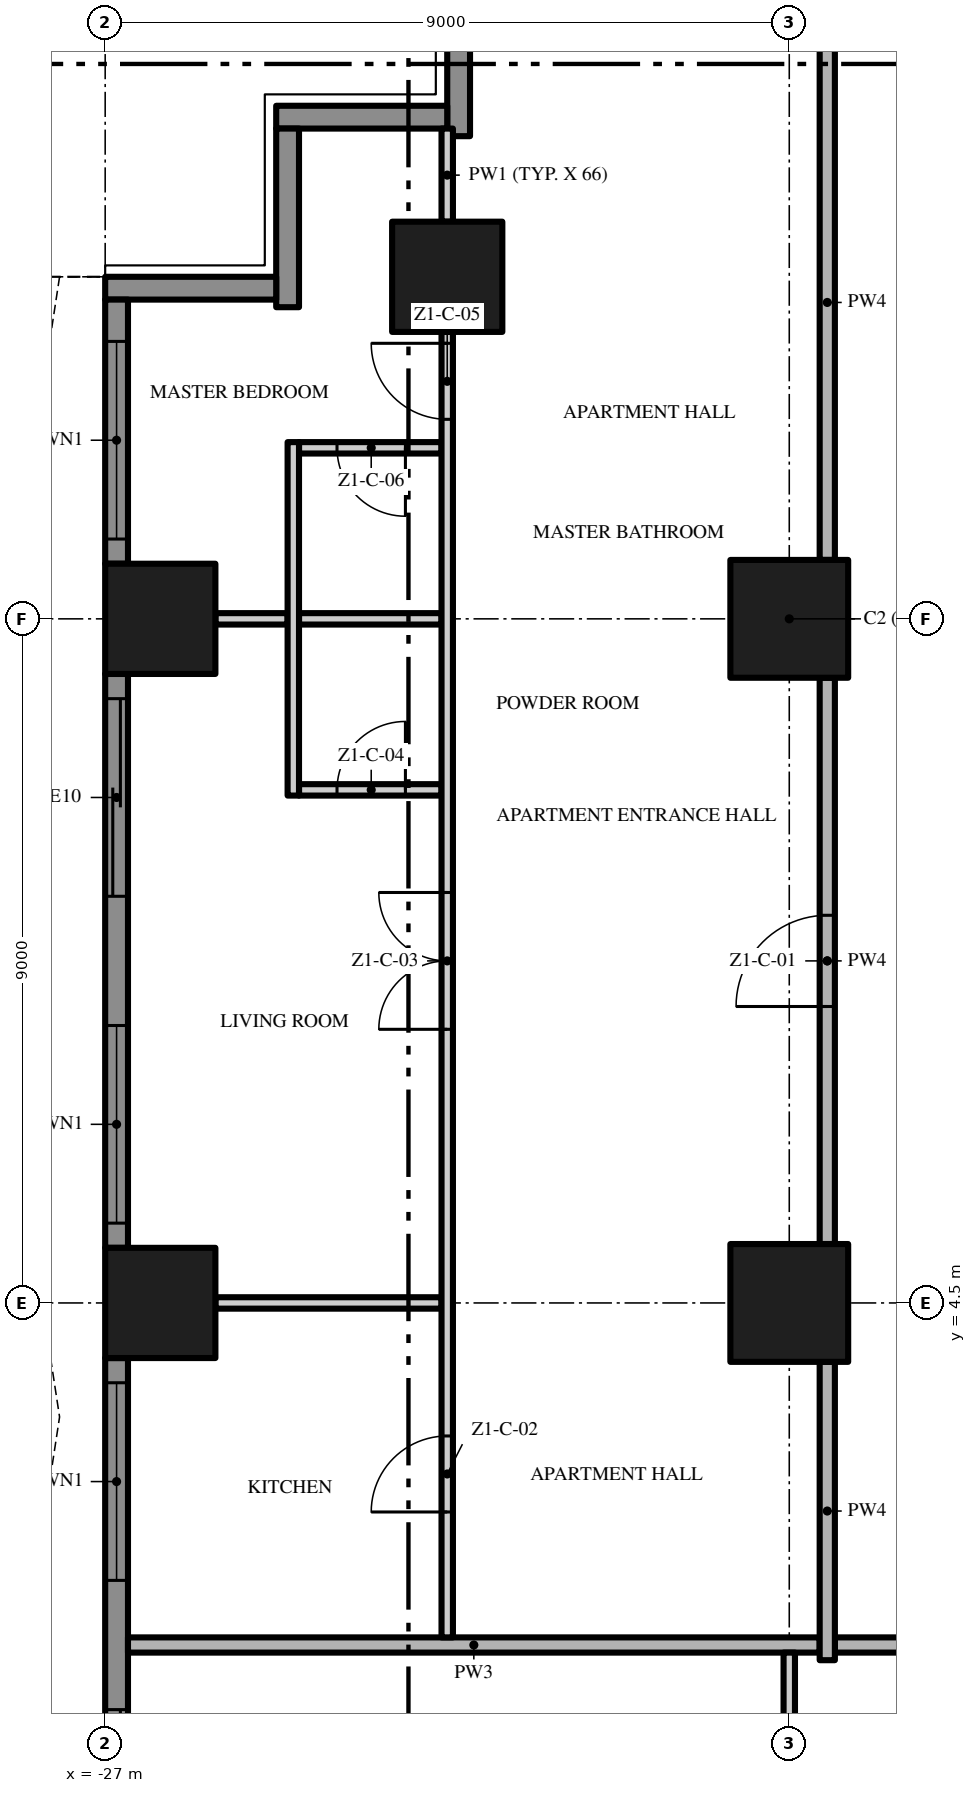
"""IFC4 building model, lengths in metres.
Left out: names, types, materials, properties, quantities, classifications, styles, units other than length and angle.
Written with IfcOpenShell. Run it as: python <this file> out.ifc"""

import sys

from ifc_helpers import new_model, si_unit, direction, frame, frame_2d, origin, origin_2d, place, context, subcontext, project, spatial, polyline, rectangle, outline, extrude, element, fill, save


model = new_model("IFC4")
c1 = context("Model", 3, precision=1e-05, world=origin(), true_north=direction((0.0, 1.0)))
c2 = subcontext(c1, "Body", "Model", "MODEL_VIEW")
j1 = project(units=[si_unit("LENGTHUNIT", "METRE"), si_unit("PLANEANGLEUNIT", "RADIAN")], contexts=[c1])
p1 = place(None, origin())
s1 = spatial("IfcSite", under=j1, at=p1, CompositionType="ELEMENT")
p2 = place(p1, origin())
s2 = spatial("IfcBuilding", under=s1, at=p2, CompositionType="ELEMENT")
p3 = place(p2, frame((0.0, 0.0, 37.8)))
s3 = spatial("IfcBuildingStorey", under=s2, at=p3, CompositionType="ELEMENT", Elevation=37.8)
for number, where, z_axis, x_axis in (
    (1, (-18.0, 13.5, 0.0), (0.0, 0.0, 1.0), (1.0, 0.0, 0.0)),
    (2, (-18.0, 4.5, 0.0), (0.0, 0.0, 1.0), (1.0, 0.0, 0.0)),
):
    element("IfcColumn", number, at=place(p3, frame(where, z_axis=z_axis, x_axis=x_axis)), inside=s3, PredefinedType="COLUMN", context=c2, shape_type="SweptSolid", body=[
        extrude(rectangle(XDim=1.55, YDim=1.55, at=origin_2d()), origin(), (0.0, 0.0, 1.0), 3.5),
    ])
for number, where, z_axis, x_axis in (
    (3, (-26.275, 13.5, 0.0), (0.0, 0.0, 1.0), (1.0, 0.0, 0.0)),
    (4, (-22.5, 18.0, 0.0), (0.0, 0.0, 1.0), (1.0, 0.0, 0.0)),
    (5, (-26.275, 4.5, 0.0), (0.0, 0.0, 1.0), (1.0, 0.0, 0.0)),
):
    element("IfcColumn", number, at=place(p3, frame(where, z_axis=z_axis, x_axis=x_axis)), inside=s3, PredefinedType="COLUMN", context=c2, shape_type="SweptSolid", body=[
        extrude(rectangle(XDim=1.45, YDim=1.45, at=origin_2d()), origin(), (0.0, 0.0, 1.0), 3.5),
    ])
p4 = place(p3, frame((-22.35, 19.85, 0.0), z_axis=(0.0, 0.0, 1.0), x_axis=(0.0, 1.0, 0.0)))
e6 = element("IfcWall", 6, at=p4, inside=s3, PredefinedType="SOLIDWALL", context=c2, shape_type="SweptSolid", body=[
    extrude(rectangle(XDim=2.35, YDim=0.3, at=frame_2d((1.175, 0.0))), origin(), (0.0, 0.0, 1.0), 3.5),
])
p5 = place(p3, frame((-24.75, 20.1, 0.0), z_axis=(0.0, 0.0, 1.0), x_axis=(1.0, 0.0, 0.0)))
e7 = element("IfcWall", 7, at=p5, inside=s3, PredefinedType="SOLIDWALL", context=c2, shape_type="SweptSolid", body=[
    extrude(rectangle(XDim=2.25, YDim=0.3, at=frame_2d((1.125, 0.0))), origin(), (0.0, 0.0, 1.0), 3.5),
])
p6 = place(p3, frame((-24.6, 17.6, 0.0), z_axis=(0.0, 0.0, 1.0), x_axis=(0.0, 1.0, 0.0)))
e8 = element("IfcWall", 8, at=p6, inside=s3, PredefinedType="SOLIDWALL", context=c2, shape_type="SweptSolid", body=[
    extrude(rectangle(XDim=2.35, YDim=0.3, at=frame_2d((1.175, 0.0))), origin(), (0.0, 0.0, 1.0), 3.5),
])
p7 = place(p3, frame((-27.0, 17.85, 0.0), z_axis=(0.0, 0.0, 1.0), x_axis=(1.0, 0.0, 0.0)))
e9 = element("IfcWall", 9, at=p7, inside=s3, PredefinedType="SOLIDWALL", context=c2, shape_type="SweptSolid", body=[
    extrude(rectangle(XDim=2.25, YDim=0.3, at=frame_2d((1.125, 0.0))), origin(), (0.0, 0.0, 1.0), 3.5),
])
p8 = place(p3, frame((-26.85, 14.225, 0.0), z_axis=(0.0, 0.0, 1.0), x_axis=(0.0, 1.0, 0.0)))
e10 = element("IfcWall", 10, at=p8, inside=s3, PredefinedType="SOLIDWALL", context=c2, shape_type="SweptSolid", body=[
    extrude(rectangle(XDim=3.475, YDim=0.3, at=frame_2d((1.738, 0.0))), origin(), (0.0, 0.0, 1.0), 3.5),
])
p9 = place(p8, frame((0.325, 0.0, 0.45)))
e11 = element("IfcOpeningElement", 11, at=p9, cuts=e10, PredefinedType="OPENING", context=c2, shape_type="SweptSolid", body=[
    extrude(rectangle(XDim=2.6, YDim=2.65, at=frame_2d((1.3, 1.325))), frame((0.0, 0.16, 0.0), z_axis=(0.0, -1.0, 0.0), x_axis=(1.0, 0.0, 0.0)), (0.0, 0.0, 1.0), 0.32),
])
p10 = place(p3, frame((-26.85, 5.225, 0.0), z_axis=(0.0, 0.0, 1.0), x_axis=(0.0, 1.0, 0.0)))
e12 = element("IfcWall", 12, at=p10, inside=s3, PredefinedType="SOLIDWALL", context=c2, shape_type="SweptSolid", body=[
    extrude(rectangle(XDim=7.55, YDim=0.3, at=frame_2d((3.775, 0.0))), origin(), (0.0, 0.0, 1.0), 3.5),
])
p11 = place(p10, frame((4.625, 0.0, 0.0)))
e13 = element("IfcOpeningElement", 13, at=p11, cuts=e12, PredefinedType="OPENING", context=c2, shape_type="SweptSolid", body=[
    extrude(rectangle(XDim=2.6, YDim=2.4, at=frame_2d((1.3, 1.2))), frame((0.0, 0.16, 0.0), z_axis=(0.0, -1.0, 0.0), x_axis=(1.0, 0.0, 0.0)), (0.0, 0.0, 1.0), 0.32),
])
p12 = place(p10, frame((0.325, 0.0, 0.45)))
e14 = element("IfcOpeningElement", 14, at=p12, cuts=e12, PredefinedType="OPENING", context=c2, shape_type="SweptSolid", body=[
    extrude(rectangle(XDim=2.6, YDim=2.65, at=frame_2d((1.3, 1.325))), frame((0.0, 0.16, 0.0), z_axis=(0.0, -1.0, 0.0), x_axis=(1.0, 0.0, 0.0)), (0.0, 0.0, 1.0), 0.32),
])
p13 = place(p3, frame((-26.85, -3.775, 0.0), z_axis=(0.0, 0.0, 1.0), x_axis=(0.0, 1.0, 0.0)))
e15 = element("IfcWall", 15, at=p13, inside=s3, PredefinedType="SOLIDWALL", context=c2, shape_type="SweptSolid", body=[
    extrude(rectangle(XDim=7.55, YDim=0.3, at=frame_2d((3.775, 0.0))), origin(), (0.0, 0.0, 1.0), 3.5),
])
p14 = place(p13, frame((4.625, 0.0, 0.45)))
e16 = element("IfcOpeningElement", 16, at=p14, cuts=e15, PredefinedType="OPENING", context=c2, shape_type="SweptSolid", body=[
    extrude(rectangle(XDim=2.6, YDim=2.65, at=frame_2d((1.3, 1.325))), frame((0.0, 0.16, 0.0), z_axis=(0.0, -1.0, 0.0), x_axis=(1.0, 0.0, 0.0)), (0.0, 0.0, 1.0), 0.32),
])
p15 = place(p13, frame((0.325, 0.0, 0.0)))
e17 = element("IfcOpeningElement", 17, at=p15, cuts=e15, PredefinedType="OPENING", context=c2, shape_type="SweptSolid", body=[
    extrude(rectangle(XDim=2.6, YDim=2.4, at=frame_2d((1.3, 1.2))), frame((0.0, 0.16, 0.0), z_axis=(0.0, -1.0, 0.0), x_axis=(1.0, 0.0, 0.0)), (0.0, 0.0, 1.0), 0.32),
])
p16 = place(p3, origin())
e18 = element("IfcWall", 18, at=p16, inside=s3, PredefinedType="USERDEFINED", context=c2, shape_type="SweptSolid", body=[
    extrude(outline(polyline([(-27.6, 18.0), (-27.829, 16.5), (-28.429, 15.0), (-29.171, 13.5), (-29.771, 12.0), (-30.0, 10.5), (-29.771, 9.0), (-29.171, 7.5), (-28.429, 6.0), (-27.829, 4.5), (-27.6, 3.0), (-27.829, 1.5), (-28.429, 0.0), (-29.171, -1.5), (-29.771, -3.0), (-30.0, -4.5), (-29.771, -6.0), (-29.171, -7.5), (-28.429, -9.0), (-27.829, -10.5), (-27.6, -12.0), (-27.829, -13.5), (-28.429, -15.0), (-29.171, -16.5), (-29.771, -18.0), (-29.539, -18.093), (-28.942, -16.602), (-28.201, -15.102), (-27.586, -13.566), (-27.347, -12.0), (-27.586, -10.434), (-28.201, -8.898), (-28.942, -7.398), (-29.528, -5.934), (-29.747, -4.5), (-29.528, -3.066), (-28.942, -1.602), (-28.201, -0.102), (-27.586, 1.434), (-27.347, 3.0), (-27.586, 4.566), (-28.201, 6.102), (-28.942, 7.602), (-29.528, 9.066), (-29.747, 10.5), (-29.528, 11.934), (-28.942, 13.398), (-28.201, 14.898), (-27.586, 16.434), (-27.353, 17.962), (-27.6, 18.0)])), origin(), (0.0, 0.0, 1.0), 0.9),
])
p17 = place(p3, frame((-17.4, 0.0, 0.0), z_axis=(0.0, 0.0, 1.0), x_axis=(1.0, 0.0, 0.0)))
e19 = element("IfcWall", 19, at=p17, inside=s3, PredefinedType="PARTITIONING", context=c2, shape_type="SweptSolid", body=[
    extrude(rectangle(XDim=12.8, YDim=0.2, at=frame_2d((6.4, 0.0))), origin(), (0.0, 0.0, 1.0), 3.5),
])
p18 = place(p3, frame((-26.7, 0.0, 0.0), z_axis=(0.0, 0.0, 1.0), x_axis=(1.0, 0.0, 0.0)))
e20 = element("IfcWall", 20, at=p18, inside=s3, PredefinedType="PARTITIONING", context=c2, shape_type="SweptSolid", body=[
    extrude(rectangle(XDim=9.1, YDim=0.2, at=frame_2d((4.55, 0.0))), origin(), (0.0, 0.0, 1.0), 3.5),
])
p19 = place(p3, frame((-25.55, 4.5, 0.0), z_axis=(0.0, 0.0, 1.0), x_axis=(1.0, 0.0, 0.0)))
e21 = element("IfcWall", 21, at=p19, inside=s3, PredefinedType="PARTITIONING", context=c2, shape_type="SweptSolid", body=[
    extrude(rectangle(XDim=2.975, YDim=0.15, at=frame_2d((1.488, 0.0))), origin(), (0.0, 0.0, 1.0), 3.5),
])
p20 = place(p3, frame((-24.45, 11.25, 0.0), z_axis=(0.0, 0.0, 1.0), x_axis=(1.0, 0.0, 0.0)))
e22 = element("IfcWall", 22, at=p20, inside=s3, PredefinedType="PARTITIONING", context=c2, shape_type="SweptSolid", body=[
    extrude(rectangle(XDim=1.875, YDim=0.15, at=frame_2d((0.938, 0.0))), origin(), (0.0, 0.0, 1.0), 3.5),
])
p21 = place(p20, frame((0.5, 0.0, 0.0)))
e23 = element("IfcOpeningElement", 23, at=p21, cuts=e22, PredefinedType="OPENING", context=c2, shape_type="SweptSolid", body=[
    extrude(rectangle(XDim=0.9, YDim=2.1, at=frame_2d((0.45, 1.05))), frame((0.0, 0.085, 0.0), z_axis=(0.0, -1.0, 0.0), x_axis=(1.0, 0.0, 0.0)), (0.0, 0.0, 1.0), 0.17),
])
p22 = place(p3, frame((-25.55, 13.5, 0.0), z_axis=(0.0, 0.0, 1.0), x_axis=(1.0, 0.0, 0.0)))
e24 = element("IfcWall", 24, at=p22, inside=s3, PredefinedType="PARTITIONING", context=c2, shape_type="SweptSolid", body=[
    extrude(rectangle(XDim=0.95, YDim=0.15, at=frame_2d((0.475, 0.0))), origin(), (0.0, 0.0, 1.0), 3.5),
])
p23 = place(p3, frame((-24.45, 13.5, 0.0), z_axis=(0.0, 0.0, 1.0), x_axis=(1.0, 0.0, 0.0)))
e25 = element("IfcWall", 25, at=p23, inside=s3, PredefinedType="PARTITIONING", context=c2, shape_type="SweptSolid", body=[
    extrude(rectangle(XDim=1.875, YDim=0.15, at=frame_2d((0.938, 0.0))), origin(), (0.0, 0.0, 1.0), 3.5),
])
p24 = place(p3, frame((-22.575, 15.75, 0.0), z_axis=(0.0, 0.0, 1.0), x_axis=(-1.0, 0.0, 0.0)))
e26 = element("IfcWall", 26, at=p24, inside=s3, PredefinedType="PARTITIONING", context=c2, shape_type="SweptSolid", body=[
    extrude(rectangle(XDim=1.875, YDim=0.15, at=frame_2d((0.938, 0.0))), origin(), (0.0, 0.0, 1.0), 3.5),
])
p25 = place(p24, frame((0.475, 0.0, 0.0)))
e27 = element("IfcOpeningElement", 27, at=p25, cuts=e26, PredefinedType="OPENING", context=c2, shape_type="SweptSolid", body=[
    extrude(rectangle(XDim=0.9, YDim=2.1, at=frame_2d((0.45, 1.05))), frame((0.0, 0.085, 0.0), z_axis=(0.0, -1.0, 0.0), x_axis=(1.0, 0.0, 0.0)), (0.0, 0.0, 1.0), 0.17),
])
p26 = place(p3, frame((-24.525, 11.175, 0.0), z_axis=(0.0, 0.0, 1.0), x_axis=(0.0, 1.0, 0.0)))
e28 = element("IfcWall", 28, at=p26, inside=s3, PredefinedType="PARTITIONING", context=c2, shape_type="SweptSolid", body=[
    extrude(rectangle(XDim=4.65, YDim=0.15, at=frame_2d((2.325, 0.0))), origin(), (0.0, 0.0, 1.0), 3.5),
])
p27 = place(p3, frame((-22.5, 0.1, 0.0), z_axis=(0.0, 0.0, 1.0), x_axis=(0.0, 1.0, 0.0)))
e29 = element("IfcWall", 29, at=p27, inside=s3, PredefinedType="PARTITIONING", context=c2, shape_type="SweptSolid", body=[
    extrude(rectangle(XDim=17.175, YDim=0.15, at=frame_2d((8.588, 0.0))), origin(), (0.0, 0.0, 1.0), 3.5),
])
p28 = place(p27, frame((1.65, 0.0, 0.0)))
e30 = element("IfcOpeningElement", 30, at=p28, cuts=e29, PredefinedType="OPENING", context=c2, shape_type="SweptSolid", body=[
    extrude(rectangle(XDim=1.0, YDim=2.4, at=frame_2d((0.5, 1.2))), frame((0.0, 0.085, 0.0), z_axis=(0.0, -1.0, 0.0), x_axis=(1.0, 0.0, 0.0)), (0.0, 0.0, 1.0), 0.17),
])
p29 = place(p27, frame((8.0, 0.0, 0.0)))
e31 = element("IfcOpeningElement", 31, at=p29, cuts=e29, PredefinedType="OPENING", context=c2, shape_type="SweptSolid", body=[
    extrude(rectangle(XDim=1.8, YDim=2.4, at=frame_2d((0.9, 1.2))), frame((0.0, 0.085, 0.0), z_axis=(0.0, -1.0, 0.0), x_axis=(1.0, 0.0, 0.0)), (0.0, 0.0, 1.0), 0.17),
])
p30 = place(p27, frame((16.025, 0.0, 0.0)))
e32 = element("IfcOpeningElement", 32, at=p30, cuts=e29, PredefinedType="OPENING", context=c2, shape_type="SweptSolid", body=[
    extrude(rectangle(XDim=1.0, YDim=2.4, at=frame_2d((0.5, 1.2))), frame((0.0, 0.085, 0.0), z_axis=(0.0, -1.0, 0.0), x_axis=(1.0, 0.0, 0.0)), (0.0, 0.0, 1.0), 0.17),
])
p31 = place(p3, frame((-22.5, 18.725, 0.0), z_axis=(0.0, 0.0, 1.0), x_axis=(0.0, 1.0, 0.0)))
e33 = element("IfcWall", 33, at=p31, inside=s3, PredefinedType="PARTITIONING", context=c2, shape_type="SweptSolid", body=[
    extrude(rectangle(XDim=1.225, YDim=0.15, at=frame_2d((0.613, 0.0))), origin(), (0.0, 0.0, 1.0), 3.5),
])
p32 = place(p3, frame((-18.0, -3.725, 0.0), z_axis=(0.0, 0.0, 1.0), x_axis=(0.0, 1.0, 0.0)))
e34 = element("IfcWall", 34, at=p32, inside=s3, PredefinedType="PARTITIONING", context=c2, shape_type="SweptSolid", body=[
    extrude(rectangle(XDim=3.625, YDim=0.15, at=frame_2d((1.812, 0.0))), origin(), (0.0, 0.0, 1.0), 3.5),
])
p33 = place(p32, frame((1.0, 0.0, 0.0)))
e35 = element("IfcOpeningElement", 35, at=p33, cuts=e34, PredefinedType="OPENING", context=c2, shape_type="SweptSolid", body=[
    extrude(rectangle(XDim=1.0, YDim=2.4, at=frame_2d((0.5, 1.2))), frame((0.0, 0.085, 0.0), z_axis=(0.0, -1.0, 0.0), x_axis=(1.0, 0.0, 0.0)), (0.0, 0.0, 1.0), 0.17),
])
p34 = place(p3, frame((-17.5, -0.2, 0.0), z_axis=(0.0, 0.0, 1.0), x_axis=(0.0, 1.0, 0.0)))
e36 = element("IfcWall", 36, at=p34, inside=s3, PredefinedType="PARTITIONING", context=c2, shape_type="SweptSolid", body=[
    extrude(rectangle(XDim=3.925, YDim=0.2, at=frame_2d((1.962, 0.0))), origin(), (0.0, 0.0, 1.0), 3.5),
])
p35 = place(p3, frame((-17.5, 5.275, 0.0), z_axis=(0.0, 0.0, 1.0), x_axis=(0.0, 1.0, 0.0)))
e37 = element("IfcWall", 37, at=p35, inside=s3, PredefinedType="PARTITIONING", context=c2, shape_type="SweptSolid", body=[
    extrude(rectangle(XDim=7.45, YDim=0.2, at=frame_2d((3.725, 0.0))), origin(), (0.0, 0.0, 1.0), 3.5),
])
p36 = place(p35, frame((3.125, 0.0, 0.0)))
e38 = element("IfcOpeningElement", 38, at=p36, cuts=e37, PredefinedType="OPENING", context=c2, shape_type="SweptSolid", body=[
    extrude(rectangle(XDim=1.2, YDim=2.4, at=frame_2d((0.6, 1.2))), frame((0.0, 0.11, 0.0), z_axis=(0.0, -1.0, 0.0), x_axis=(1.0, 0.0, 0.0)), (0.0, 0.0, 1.0), 0.22),
])
p37 = place(p3, frame((-17.5, 14.275, 0.0), z_axis=(0.0, 0.0, 1.0), x_axis=(0.0, 1.0, 0.0)))
e39 = element("IfcWall", 39, at=p37, inside=s3, PredefinedType="PARTITIONING", context=c2, shape_type="SweptSolid", body=[
    extrude(rectangle(XDim=6.775, YDim=0.2, at=frame_2d((3.388, 0.0))), origin(), (0.0, 0.0, 1.0), 3.5),
])
p38 = place(p9, origin())
e40 = element("IfcWindow", 40, at=p38, inside=s3, PartitioningType="SINGLE_PANEL", PredefinedType="WINDOW", context=c2, shape_type="SweptSolid", body=[
    extrude(rectangle(XDim=2.6, YDim=2.65, at=frame_2d((1.3, 1.325))), frame((0.0, 0.03, 0.0), z_axis=(0.0, -1.0, 0.0), x_axis=(1.0, 0.0, 0.0)), (0.0, 0.0, 1.0), 0.06),
])
fill(e11, e40)
p39 = place(p11, origin())
e41 = element("IfcDoor", 41, at=p39, inside=s3, OperationType="SINGLE_SWING_LEFT", PredefinedType="DOOR", context=c2, shape_type="SweptSolid", body=[
    extrude(rectangle(XDim=2.6, YDim=2.4, at=frame_2d((1.3, 1.2))), frame((0.0, 0.025, 0.0), z_axis=(0.0, -1.0, 0.0), x_axis=(1.0, 0.0, 0.0)), (0.0, 0.0, 1.0), 0.05),
])
fill(e13, e41)
p40 = place(p12, origin())
e42 = element("IfcWindow", 42, at=p40, inside=s3, PartitioningType="SINGLE_PANEL", PredefinedType="WINDOW", context=c2, shape_type="SweptSolid", body=[
    extrude(rectangle(XDim=2.6, YDim=2.65, at=frame_2d((1.3, 1.325))), frame((0.0, 0.03, 0.0), z_axis=(0.0, -1.0, 0.0), x_axis=(1.0, 0.0, 0.0)), (0.0, 0.0, 1.0), 0.06),
])
fill(e14, e42)
p41 = place(p14, origin())
e43 = element("IfcWindow", 43, at=p41, inside=s3, PartitioningType="SINGLE_PANEL", PredefinedType="WINDOW", context=c2, shape_type="SweptSolid", body=[
    extrude(rectangle(XDim=2.6, YDim=2.65, at=frame_2d((1.3, 1.325))), frame((0.0, 0.03, 0.0), z_axis=(0.0, -1.0, 0.0), x_axis=(1.0, 0.0, 0.0)), (0.0, 0.0, 1.0), 0.06),
])
fill(e16, e43)
p42 = place(p15, origin())
e44 = element("IfcDoor", 44, at=p42, inside=s3, OperationType="SINGLE_SWING_LEFT", PredefinedType="DOOR", context=c2, shape_type="SweptSolid", body=[
    extrude(rectangle(XDim=2.6, YDim=2.4, at=frame_2d((1.3, 1.2))), frame((0.0, 0.025, 0.0), z_axis=(0.0, -1.0, 0.0), x_axis=(1.0, 0.0, 0.0)), (0.0, 0.0, 1.0), 0.05),
])
fill(e17, e44)
p43 = place(p36, origin())
e45 = element("IfcDoor", 45, at=p43, inside=s3, OperationType="SINGLE_SWING_LEFT", PredefinedType="DOOR", context=c2, shape_type="SweptSolid", body=[
    extrude(rectangle(XDim=1.2, YDim=2.4, at=frame_2d((0.6, 1.2))), frame((0.0, 0.025, 0.0), z_axis=(0.0, -1.0, 0.0), x_axis=(1.0, 0.0, 0.0)), (0.0, 0.0, 1.0), 0.05),
])
fill(e38, e45)
p44 = place(p28, origin())
e46 = element("IfcDoor", 46, at=p44, inside=s3, OperationType="SINGLE_SWING_LEFT", PredefinedType="DOOR", context=c2, shape_type="SweptSolid", body=[
    extrude(rectangle(XDim=1.0, YDim=2.4, at=frame_2d((0.5, 1.2))), frame((0.0, 0.025, 0.0), z_axis=(0.0, -1.0, 0.0), x_axis=(1.0, 0.0, 0.0)), (0.0, 0.0, 1.0), 0.05),
])
fill(e30, e46)
p45 = place(p29, origin())
e47 = element("IfcDoor", 47, at=p45, inside=s3, OperationType="DOUBLE_DOOR_SINGLE_SWING", PredefinedType="DOOR", context=c2, shape_type="SweptSolid", body=[
    extrude(rectangle(XDim=1.8, YDim=2.4, at=frame_2d((0.9, 1.2))), frame((0.0, 0.025, 0.0), z_axis=(0.0, -1.0, 0.0), x_axis=(1.0, 0.0, 0.0)), (0.0, 0.0, 1.0), 0.05),
])
fill(e31, e47)
p46 = place(p21, origin())
e48 = element("IfcDoor", 48, at=p46, inside=s3, OperationType="SINGLE_SWING_RIGHT", PredefinedType="DOOR", context=c2, shape_type="SweptSolid", body=[
    extrude(rectangle(XDim=0.9, YDim=2.1, at=frame_2d((0.45, 1.05))), frame((0.0, 0.025, 0.0), z_axis=(0.0, -1.0, 0.0), x_axis=(1.0, 0.0, 0.0)), (0.0, 0.0, 1.0), 0.05),
])
fill(e23, e48)
p47 = place(p30, origin())
e49 = element("IfcDoor", 49, at=p47, inside=s3, OperationType="SINGLE_SWING_RIGHT", PredefinedType="DOOR", context=c2, shape_type="SweptSolid", body=[
    extrude(rectangle(XDim=1.0, YDim=2.4, at=frame_2d((0.5, 1.2))), frame((0.0, 0.025, 0.0), z_axis=(0.0, -1.0, 0.0), x_axis=(1.0, 0.0, 0.0)), (0.0, 0.0, 1.0), 0.05),
])
fill(e32, e49)
p48 = place(p25, origin())
e50 = element("IfcDoor", 50, at=p48, inside=s3, OperationType="SINGLE_SWING_LEFT", PredefinedType="DOOR", context=c2, shape_type="SweptSolid", body=[
    extrude(rectangle(XDim=0.9, YDim=2.1, at=frame_2d((0.45, 1.05))), frame((0.0, 0.025, 0.0), z_axis=(0.0, -1.0, 0.0), x_axis=(1.0, 0.0, 0.0)), (0.0, 0.0, 1.0), 0.05),
])
fill(e27, e50)
save(model, sys.argv[1])
